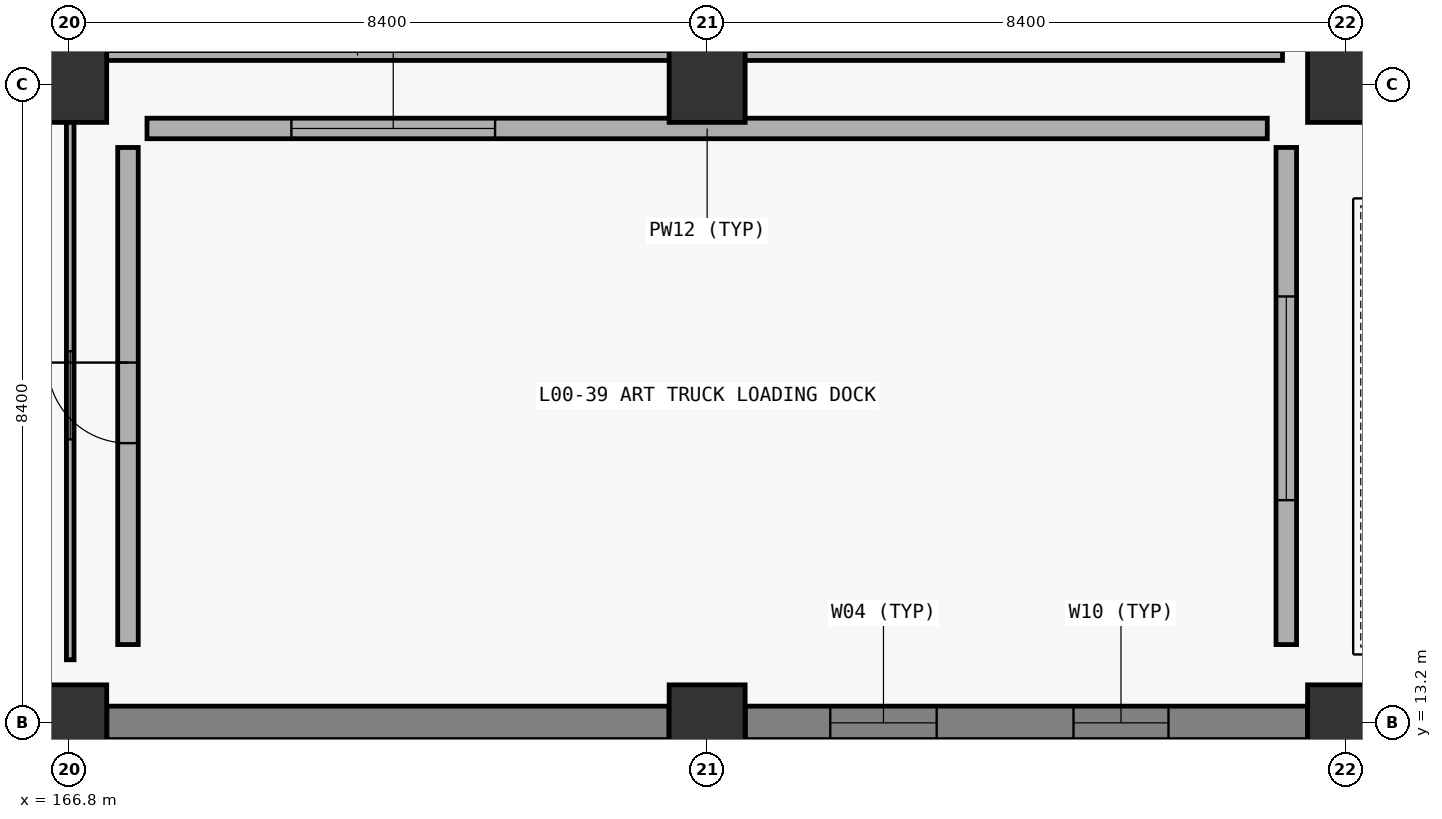
"""IFC4 building model, lengths in metres.
Left out: names, types, materials, properties, quantities, classifications, styles, units other than length and angle.
Written with IfcOpenShell. Run it as: python <this file> out.ifc"""

import sys

from ifc_helpers import new_model, si_unit, direction, frame, frame_2d, origin, origin_2d, place, context, subcontext, project, spatial, rectangle, extrude, element, fill, save


model = new_model("IFC4")
c1 = context("Model", 3, precision=1e-05, world=origin(), true_north=direction((0.0, 1.0)))
c2 = subcontext(c1, "Body", "Model", "MODEL_VIEW")
j1 = project(units=[si_unit("LENGTHUNIT", "METRE"), si_unit("PLANEANGLEUNIT", "RADIAN")], contexts=[c1])
p1 = place(None, origin())
s1 = spatial("IfcSite", under=j1, at=p1, CompositionType="ELEMENT")
p2 = place(p1, origin())
s2 = spatial("IfcBuilding", under=s1, at=p2, CompositionType="ELEMENT")
p3 = place(p2, origin())
s3 = spatial("IfcBuildingStorey", under=s2, at=p3, CompositionType="ELEMENT", Elevation=0.0)
for number, where, z_axis, x_axis in (
    (1, (166.8, 13.2, 0.0), (0.0, 0.0, 1.0), (1.0, 0.0, 0.0)),
    (2, (166.8, 21.6, 0.0), (0.0, 0.0, 1.0), (1.0, 0.0, 0.0)),
    (3, (175.2, 13.2, 0.0), (0.0, 0.0, 1.0), (1.0, 0.0, 0.0)),
    (4, (175.2, 21.6, 0.0), (0.0, 0.0, 1.0), (1.0, 0.0, 0.0)),
    (5, (183.6, 13.2, 0.0), (0.0, 0.0, 1.0), (1.0, 0.0, 0.0)),
    (6, (183.6, 21.6, 0.0), (0.0, 0.0, 1.0), (1.0, 0.0, 0.0)),
):
    element("IfcColumn", number, at=place(p3, frame(where, z_axis=z_axis, x_axis=x_axis)), inside=s3, PredefinedType="COLUMN", context=c2, shape_type="SweptSolid", body=[
        extrude(rectangle(XDim=1.0, YDim=1.0, at=origin_2d()), origin(), (0.0, 0.0, 1.0), 5.4),
    ])
p4 = place(p3, frame((167.302, 13.2, 0.0), z_axis=(0.0, 0.0, 1.0), x_axis=(1.0, 0.0, 0.0)))
e7 = element("IfcWall", 7, at=p4, inside=s3, PredefinedType="SOLIDWALL", context=c2, shape_type="SweptSolid", body=[
    extrude(rectangle(XDim=7.396, YDim=0.44, at=frame_2d((3.698, 0.0))), origin(), (0.0, 0.0, 1.0), 3.405),
])
p5 = place(p3, frame((175.702, 13.2, 0.0), z_axis=(0.0, 0.0, 1.0), x_axis=(1.0, 0.0, 0.0)))
e8 = element("IfcWall", 8, at=p5, inside=s3, PredefinedType="SOLIDWALL", context=c2, shape_type="SweptSolid", body=[
    extrude(rectangle(XDim=7.396, YDim=0.44, at=frame_2d((3.698, 0.0))), origin(), (0.0, 0.0, 1.0), 4.69),
])
p6 = place(p5, frame((1.118, 0.0, 0.9)))
e9 = element("IfcOpeningElement", 9, at=p6, cuts=e8, PredefinedType="OPENING", context=c2, shape_type="SweptSolid", body=[
    extrude(rectangle(XDim=1.4, YDim=2.2, at=frame_2d((0.7, 1.1))), frame((0.0, 0.23, 0.0), z_axis=(0.0, -1.0, 0.0), x_axis=(1.0, 0.0, 0.0)), (0.0, 0.0, 1.0), 0.46),
])
p7 = place(p5, frame((4.318, 0.0, 0.9)))
e10 = element("IfcOpeningElement", 10, at=p7, cuts=e8, PredefinedType="OPENING", context=c2, shape_type="SweptSolid", body=[
    extrude(rectangle(XDim=1.25, YDim=2.05, at=frame_2d((0.625, 1.025))), frame((0.0, 0.23, 0.0), z_axis=(0.0, -1.0, 0.0), x_axis=(1.0, 0.0, 0.0)), (0.0, 0.0, 1.0), 0.46),
])
p8 = place(p3, frame((167.58, 14.23, 0.0), z_axis=(0.0, 0.0, 1.0), x_axis=(0.0, 1.0, 0.0)))
e11 = element("IfcWall", 11, at=p8, inside=s3, PredefinedType="PARTITIONING", context=c2, shape_type="SweptSolid", body=[
    extrude(rectangle(XDim=6.54, YDim=0.27, at=frame_2d((3.27, 0.0))), origin(), (0.0, 0.0, 1.0), 5.04),
])
p9 = place(p8, frame((2.65, 0.0, 0.0)))
e12 = element("IfcOpeningElement", 12, at=p9, cuts=e11, PredefinedType="OPENING", context=c2, shape_type="SweptSolid", body=[
    extrude(rectangle(XDim=1.06, YDim=2.2, at=frame_2d((0.53, 1.1))), frame((0.0, 0.145, 0.0), z_axis=(0.0, -1.0, 0.0), x_axis=(1.0, 0.0, 0.0)), (0.0, 0.0, 1.0), 0.29),
])
p10 = place(p3, frame((167.83, 21.02, 0.0), z_axis=(0.0, 0.0, 1.0), x_axis=(1.0, 0.0, 0.0)))
e13 = element("IfcWall", 13, at=p10, inside=s3, PredefinedType="PARTITIONING", context=c2, shape_type="SweptSolid", body=[
    extrude(rectangle(XDim=14.74, YDim=0.27, at=frame_2d((7.37, 0.0))), origin(), (0.0, 0.0, 1.0), 5.04),
])
p11 = place(p10, frame((1.9, 0.0, 0.9)))
e14 = element("IfcOpeningElement", 14, at=p11, cuts=e13, PredefinedType="OPENING", context=c2, shape_type="SweptSolid", body=[
    extrude(rectangle(XDim=2.68, YDim=1.52, at=frame_2d((1.34, 0.76))), frame((0.0, 0.145, 0.0), z_axis=(0.0, -1.0, 0.0), x_axis=(1.0, 0.0, 0.0)), (0.0, 0.0, 1.0), 0.29),
])
p12 = place(p3, frame((182.82, 14.23, 0.0), z_axis=(0.0, 0.0, 1.0), x_axis=(0.0, 1.0, 0.0)))
e15 = element("IfcWall", 15, at=p12, inside=s3, PredefinedType="PARTITIONING", context=c2, shape_type="SweptSolid", body=[
    extrude(rectangle(XDim=6.54, YDim=0.27, at=frame_2d((3.27, 0.0))), origin(), (0.0, 0.0, 1.0), 5.04),
])
p13 = place(p12, frame((1.9, 0.0, 0.9)))
e16 = element("IfcOpeningElement", 16, at=p13, cuts=e15, PredefinedType="OPENING", context=c2, shape_type="SweptSolid", body=[
    extrude(rectangle(XDim=2.68, YDim=1.52, at=frame_2d((1.34, 0.76))), frame((0.0, 0.145, 0.0), z_axis=(0.0, -1.0, 0.0), x_axis=(1.0, 0.0, 0.0)), (0.0, 0.0, 1.0), 0.29),
])
p14 = place(p3, frame((166.82, 14.03, 0.0), z_axis=(0.0, 0.0, 1.0), x_axis=(0.0, 1.0, 0.0)))
e17 = element("IfcWall", 17, at=p14, inside=s3, PredefinedType="PARTITIONING", context=c2, shape_type="SweptSolid", body=[
    extrude(rectangle(XDim=7.14, YDim=0.1, at=frame_2d((3.57, 0.0))), origin(), (0.0, 0.0, 1.0), 4.65),
])
p15 = place(p14, frame((2.9, 0.0, 0.9)))
e18 = element("IfcOpeningElement", 18, at=p15, cuts=e17, PredefinedType="OPENING", context=c2, shape_type="SweptSolid", body=[
    extrude(rectangle(XDim=1.16, YDim=1.62, at=frame_2d((0.58, 0.81))), frame((0.0, 0.06, 0.0), z_axis=(0.0, -1.0, 0.0), x_axis=(1.0, 0.0, 0.0)), (0.0, 0.0, 1.0), 0.12),
])
p16 = place(p3, frame((158.43, 21.98, 0.0), z_axis=(0.0, 0.0, 1.0), x_axis=(1.0, 0.0, 0.0)))
e19 = element("IfcWall", 19, at=p16, inside=s3, PredefinedType="PARTITIONING", context=c2, shape_type="SweptSolid", body=[
    extrude(rectangle(XDim=24.34, YDim=0.13, at=frame_2d((12.17, 0.0))), origin(), (0.0, 0.0, 1.0), 4.09),
])
p17 = place(p16, frame((3.4, 0.0, 0.9)))
e20 = element("IfcOpeningElement", 20, at=p17, cuts=e19, PredefinedType="OPENING", context=c2, shape_type="SweptSolid", body=[
    extrude(rectangle(XDim=1.58, YDim=1.24, at=frame_2d((0.79, 0.62))), frame((0.0, 0.075, 0.0), z_axis=(0.0, -1.0, 0.0), x_axis=(1.0, 0.0, 0.0)), (0.0, 0.0, 1.0), 0.15),
])
p18 = place(p6, origin())
e21 = element("IfcWindow", 21, at=p18, inside=s3, PartitioningType="SINGLE_PANEL", PredefinedType="WINDOW", context=c2, shape_type="SweptSolid", body=[
    extrude(rectangle(XDim=1.4, YDim=2.2, at=frame_2d((0.7, 1.1))), frame((0.0, 0.03, 0.0), z_axis=(0.0, -1.0, 0.0), x_axis=(1.0, 0.0, 0.0)), (0.0, 0.0, 1.0), 0.06),
])
fill(e9, e21)
p19 = place(p7, origin())
e22 = element("IfcWindow", 22, at=p19, inside=s3, PartitioningType="SINGLE_PANEL", PredefinedType="WINDOW", context=c2, shape_type="SweptSolid", body=[
    extrude(rectangle(XDim=1.25, YDim=2.05, at=frame_2d((0.625, 1.025))), frame((0.0, 0.03, 0.0), z_axis=(0.0, -1.0, 0.0), x_axis=(1.0, 0.0, 0.0)), (0.0, 0.0, 1.0), 0.06),
])
fill(e10, e22)
p20 = place(p9, origin())
e23 = element("IfcDoor", 23, at=p20, inside=s3, OperationType="SINGLE_SWING_RIGHT", PredefinedType="DOOR", context=c2, shape_type="SweptSolid", body=[
    extrude(rectangle(XDim=1.06, YDim=2.2, at=frame_2d((0.53, 1.1))), frame((0.0, 0.025, 0.0), z_axis=(0.0, -1.0, 0.0), x_axis=(1.0, 0.0, 0.0)), (0.0, 0.0, 1.0), 0.05),
])
fill(e12, e23)
p21 = place(p11, origin())
e24 = element("IfcWindow", 24, at=p21, inside=s3, PartitioningType="SINGLE_PANEL", PredefinedType="WINDOW", context=c2, shape_type="SweptSolid", body=[
    extrude(rectangle(XDim=2.68, YDim=1.52, at=frame_2d((1.34, 0.76))), frame((0.0, 0.03, 0.0), z_axis=(0.0, -1.0, 0.0), x_axis=(1.0, 0.0, 0.0)), (0.0, 0.0, 1.0), 0.06),
])
fill(e14, e24)
p22 = place(p13, origin())
e25 = element("IfcWindow", 25, at=p22, inside=s3, PartitioningType="SINGLE_PANEL", PredefinedType="WINDOW", context=c2, shape_type="SweptSolid", body=[
    extrude(rectangle(XDim=2.68, YDim=1.52, at=frame_2d((1.34, 0.76))), frame((0.0, 0.03, 0.0), z_axis=(0.0, -1.0, 0.0), x_axis=(1.0, 0.0, 0.0)), (0.0, 0.0, 1.0), 0.06),
])
fill(e16, e25)
p23 = place(p15, origin())
e26 = element("IfcWindow", 26, at=p23, inside=s3, PartitioningType="SINGLE_PANEL", PredefinedType="WINDOW", context=c2, shape_type="SweptSolid", body=[
    extrude(rectangle(XDim=1.16, YDim=1.62, at=frame_2d((0.58, 0.81))), frame((0.0, 0.03, 0.0), z_axis=(0.0, -1.0, 0.0), x_axis=(1.0, 0.0, 0.0)), (0.0, 0.0, 1.0), 0.06),
])
fill(e18, e26)
save(model, sys.argv[1])
